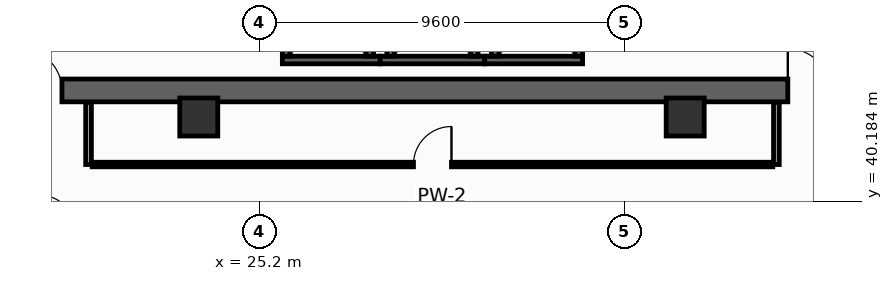
"""IFC4 building model, lengths in metres.
Left out: names, types, materials, properties, quantities, classifications, styles, units other than length and angle.
Written with IfcOpenShell. Run it as: python <this file> out.ifc"""

import sys

from ifc_helpers import new_model, si_unit, direction, frame, frame_2d, origin, origin_2d, place, context, subcontext, project, spatial, rectangle, hollow_rectangle, extrude, element, fill, save


model = new_model("IFC4")
c1 = context("Model", 3, precision=1e-05, world=origin(), true_north=direction((0.0, 1.0)))
c2 = subcontext(c1, "Body", "Model", "MODEL_VIEW")
j1 = project(units=[si_unit("LENGTHUNIT", "METRE"), si_unit("PLANEANGLEUNIT", "RADIAN")], contexts=[c1])
p1 = place(None, origin())
s1 = spatial("IfcSite", under=j1, at=p1, CompositionType="ELEMENT")
p2 = place(p1, origin())
s2 = spatial("IfcBuilding", under=s1, at=p2, CompositionType="ELEMENT")
p3 = place(p2, frame((0.0, 0.0, 110.4)))
s3 = spatial("IfcBuildingStorey", under=s2, at=p3, CompositionType="ELEMENT", Elevation=110.4)
p4 = place(p3, frame((13.5, 43.1, 0.0), z_axis=(0.0, 0.0, 1.0), x_axis=(1.0, 0.0, 0.0)))
e1 = element("IfcWall", 1, at=p4, inside=s3, PredefinedType="SHEAR", context=c2, shape_type="SweptSolid", body=[
    extrude(rectangle(XDim=32.9, YDim=0.6, at=frame_2d((16.45, 0.0))), origin(), (0.0, 0.0, 1.0), 4.15),
])
p5 = place(p4, frame((5.4, 0.0, 0.0)))
e2 = element("IfcOpeningElement", 2, at=p5, cuts=e1, PredefinedType="OPENING", context=c2, shape_type="SweptSolid", body=[
    extrude(rectangle(XDim=1.1, YDim=2.15, at=frame_2d((0.55, 1.075))), frame((0.0, 0.31, 0.0), z_axis=(0.0, -1.0, 0.0), x_axis=(1.0, 0.0, 0.0)), (0.0, 0.0, 1.0), 0.62),
])
p6 = place(p4, frame((25.6, 0.0, 0.0)))
e3 = element("IfcOpeningElement", 3, at=p6, cuts=e1, PredefinedType="OPENING", context=c2, shape_type="SweptSolid", body=[
    extrude(rectangle(XDim=1.1, YDim=2.15, at=frame_2d((0.55, 1.075))), frame((0.0, 0.31, 0.0), z_axis=(0.0, -1.0, 0.0), x_axis=(1.0, 0.0, 0.0)), (0.0, 0.0, 1.0), 0.62),
])
for number, where, z_axis, x_axis in (
    (4, (23.6, 42.4, 0.0), (0.0, 0.0, 1.0), (1.0, 0.0, 0.0)),
    (5, (36.4, 42.4, 0.0), (0.0, 0.0, 1.0), (1.0, 0.0, 0.0)),
):
    element("IfcColumn", number, at=place(p3, frame(where, z_axis=z_axis, x_axis=x_axis)), inside=s3, PredefinedType="COLUMN", context=c2, shape_type="SweptSolid", body=[
        extrude(hollow_rectangle(XDim=1.0, YDim=1.0, WallThickness=0.045, at=origin_2d()), origin(), (0.0, 0.0, 1.0), 4.4),
    ])
p7 = place(p3, frame((25.8, 43.9, 0.0), z_axis=(0.0, 0.0, 1.0), x_axis=(1.0, 0.0, 0.0)))
e6 = element("IfcWall", 6, at=p7, inside=s3, PredefinedType="SHEAR", context=c2, shape_type="SweptSolid", body=[
    extrude(rectangle(XDim=2.575, YDim=0.2, at=frame_2d((1.288, 0.0))), origin(), (0.0, 0.0, 1.0), 4.15),
])
for number, where, z_axis, x_axis in (
    (7, (25.9, 44.0, 0.0), (0.0, 0.0, 1.0), (0.0, 1.0, 0.0)),
    (8, (28.1, 44.0, 0.0), (0.0, 0.0, 1.0), (0.0, 1.0, 0.0)),
):
    element("IfcWall", number, at=place(p3, frame(where, z_axis=z_axis, x_axis=x_axis)), inside=s3, PredefinedType="SHEAR", context=c2, shape_type="SweptSolid", body=[
        extrude(rectangle(XDim=2.3, YDim=0.2, at=frame_2d((1.15, 0.0))), origin(), (0.0, 0.0, 1.0), 4.15),
    ])
p8 = place(p3, frame((28.375, 43.9, 0.0), z_axis=(0.0, 0.0, 1.0), x_axis=(1.0, 0.0, 0.0)))
e9 = element("IfcWall", 9, at=p8, inside=s3, PredefinedType="SHEAR", context=c2, shape_type="SweptSolid", body=[
    extrude(rectangle(XDim=2.75, YDim=0.2, at=frame_2d((1.375, 0.0))), origin(), (0.0, 0.0, 1.0), 4.15),
])
for number, where, z_axis, x_axis in (
    (10, (28.65, 44.0, 0.0), (0.0, 0.0, 1.0), (0.0, 1.0, 0.0)),
    (11, (30.85, 44.0, 0.0), (0.0, 0.0, 1.0), (0.0, 1.0, 0.0)),
):
    element("IfcWall", number, at=place(p3, frame(where, z_axis=z_axis, x_axis=x_axis)), inside=s3, PredefinedType="SHEAR", context=c2, shape_type="SweptSolid", body=[
        extrude(rectangle(XDim=2.3, YDim=0.2, at=frame_2d((1.15, 0.0))), origin(), (0.0, 0.0, 1.0), 4.15),
    ])
p9 = place(p3, frame((31.125, 43.9, 0.0), z_axis=(0.0, 0.0, 1.0), x_axis=(1.0, 0.0, 0.0)))
e12 = element("IfcWall", 12, at=p9, inside=s3, PredefinedType="SHEAR", context=c2, shape_type="SweptSolid", body=[
    extrude(rectangle(XDim=2.575, YDim=0.2, at=frame_2d((1.288, 0.0))), origin(), (0.0, 0.0, 1.0), 4.15),
])
for number, where, z_axis, x_axis in (
    (13, (31.4, 44.0, 0.0), (0.0, 0.0, 1.0), (0.0, 1.0, 0.0)),
    (14, (33.6, 44.0, 0.0), (0.0, 0.0, 1.0), (0.0, 1.0, 0.0)),
):
    element("IfcWall", number, at=place(p3, frame(where, z_axis=z_axis, x_axis=x_axis)), inside=s3, PredefinedType="SHEAR", context=c2, shape_type="SweptSolid", body=[
        extrude(rectangle(XDim=2.3, YDim=0.2, at=frame_2d((1.15, 0.0))), origin(), (0.0, 0.0, 1.0), 4.15),
    ])
for number, where, z_axis, x_axis in (
    (15, (20.7, 41.15, 0.0), (0.0, 0.0, 1.0), (0.0, 1.0, 0.0)),
    (16, (38.8, 41.15, 0.0), (0.0, 0.0, 1.0), (0.0, 1.0, 0.0)),
):
    element("IfcWall", number, at=place(p3, frame(where, z_axis=z_axis, x_axis=x_axis)), inside=s3, PredefinedType="PARTITIONING", context=c2, shape_type="SweptSolid", body=[
        extrude(rectangle(XDim=1.63, YDim=0.15, at=frame_2d((0.815, 0.0))), origin(), (0.0, 0.0, 1.0), 4.15),
    ])
p10 = place(p3, frame((20.795, 41.15, 0.0), z_axis=(0.0, 0.0, 1.0), x_axis=(1.0, 0.0, 0.0)))
e17 = element("IfcWall", 17, at=p10, inside=s3, PredefinedType="PARTITIONING", context=c2, shape_type="SweptSolid", body=[
    extrude(rectangle(XDim=17.91, YDim=0.12, at=frame_2d((8.955, 0.0))), origin(), (0.0, 0.0, 1.0), 3.335),
])
p11 = place(p10, frame((8.455, 0.0, 0.0)))
e18 = element("IfcOpeningElement", 18, at=p11, cuts=e17, PredefinedType="OPENING", context=c2, shape_type="SweptSolid", body=[
    extrude(rectangle(XDim=1.0, YDim=2.15, at=frame_2d((0.5, 1.075))), frame((0.0, 0.07, 0.0), z_axis=(0.0, -1.0, 0.0), x_axis=(1.0, 0.0, 0.0)), (0.0, 0.0, 1.0), 0.14),
])
p12 = place(p5, origin())
e19 = element("IfcDoor", 19, at=p12, inside=s3, OperationType="SINGLE_SWING_LEFT", PredefinedType="DOOR", context=c2, shape_type="SweptSolid", body=[
    extrude(rectangle(XDim=1.1, YDim=2.15, at=frame_2d((0.55, 1.075))), frame((0.0, 0.025, 0.0), z_axis=(0.0, -1.0, 0.0), x_axis=(1.0, 0.0, 0.0)), (0.0, 0.0, 1.0), 0.05),
])
fill(e2, e19)
p13 = place(p6, origin())
e20 = element("IfcDoor", 20, at=p13, inside=s3, OperationType="SINGLE_SWING_LEFT", PredefinedType="DOOR", context=c2, shape_type="SweptSolid", body=[
    extrude(rectangle(XDim=1.1, YDim=2.15, at=frame_2d((0.55, 1.075))), frame((0.0, 0.025, 0.0), z_axis=(0.0, -1.0, 0.0), x_axis=(1.0, 0.0, 0.0)), (0.0, 0.0, 1.0), 0.05),
])
fill(e3, e20)
p14 = place(p11, origin())
e21 = element("IfcDoor", 21, at=p14, inside=s3, OperationType="SINGLE_SWING_RIGHT", PredefinedType="DOOR", context=c2, shape_type="SweptSolid", body=[
    extrude(rectangle(XDim=1.0, YDim=2.15, at=frame_2d((0.5, 1.075))), frame((0.0, 0.025, 0.0), z_axis=(0.0, -1.0, 0.0), x_axis=(1.0, 0.0, 0.0)), (0.0, 0.0, 1.0), 0.05),
])
fill(e18, e21)
save(model, sys.argv[1])
